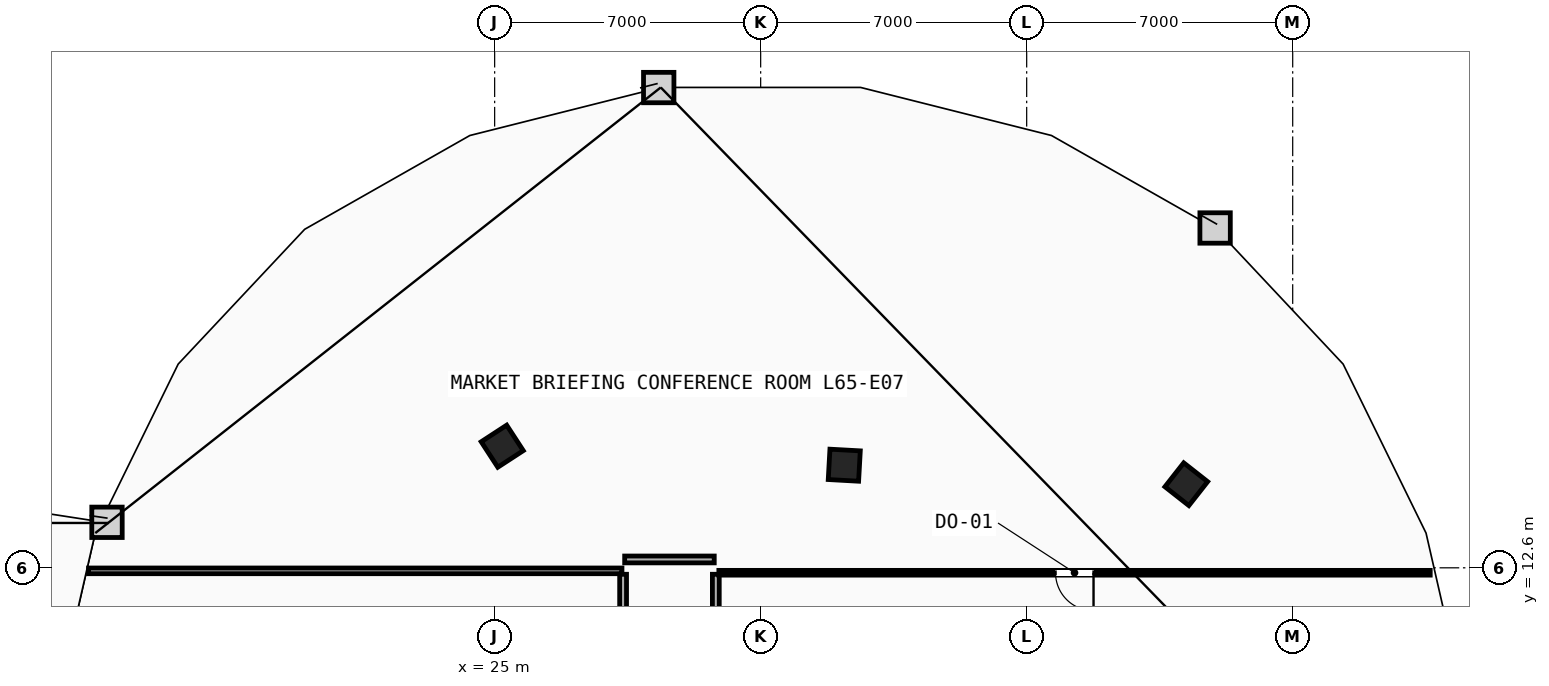
"""IFC4 building model, lengths in metres.
Left out: names, types, materials, properties, quantities, classifications, styles, units other than length and angle.
Written with IfcOpenShell. Run it as: python <this file> out.ifc"""

import sys

from ifc_helpers import new_model, si_unit, direction, frame, frame_2d, origin, origin_2d, place, context, subcontext, project, spatial, rectangle, extrude, element, fill, save


model = new_model("IFC4")
c1 = context("Model", 3, precision=1e-05, world=origin(), true_north=direction((0.0, 1.0)))
c2 = subcontext(c1, "Body", "Model", "MODEL_VIEW")
j1 = project(units=[si_unit("LENGTHUNIT", "METRE"), si_unit("PLANEANGLEUNIT", "RADIAN")], contexts=[c1])
p1 = place(None, origin())
s1 = spatial("IfcSite", under=j1, at=p1, CompositionType="ELEMENT")
p2 = place(p1, origin())
s2 = spatial("IfcBuilding", under=s1, at=p2, CompositionType="ELEMENT")
p3 = place(p2, frame((0.0, 0.0, 246.8)))
s3 = spatial("IfcBuildingStorey", under=s2, at=p3, CompositionType="ELEMENT", Elevation=246.8)
for number, where, z_axis, x_axis in (
    (1, (43.2, 14.8, 0.0), (0.0, 0.0, 1.0), (-0.786, 0.618, 0.0)),
    (2, (34.2, 15.3, 0.0), (0.0, 0.0, 1.0), (-0.998, 0.055, 0.0)),
    (3, (25.2, 15.8, 0.0), (0.0, 0.0, 1.0), (-0.838, -0.546, 0.0)),
):
    element("IfcColumn", number, at=place(p3, frame(where, z_axis=z_axis, x_axis=x_axis)), inside=s3, PredefinedType="COLUMN", context=c2, shape_type="SweptSolid", body=[
        extrude(rectangle(XDim=0.8, YDim=0.8, at=origin_2d()), origin(), (0.0, 0.0, 1.0), 3.6),
    ])
p4 = place(p3, frame((14.314, 12.52, 0.0), z_axis=(0.0, 0.0, 1.0), x_axis=(1.0, 0.0, 0.0)))
e4 = element("IfcWall", 4, at=p4, inside=s3, PredefinedType="PARTITIONING", context=c2, shape_type="SweptSolid", body=[
    extrude(rectangle(XDim=14.036, YDim=0.15, at=frame_2d((7.018, 0.0))), origin(), (0.0, 0.0, 1.0), 3.34),
])
p5 = place(p3, frame((28.38, 12.43, 0.0), z_axis=(0.0, 0.0, 1.0), x_axis=(0.0, -1.0, 0.0)))
e5 = element("IfcWall", 5, at=p5, inside=s3, PredefinedType="PARTITIONING", context=c2, shape_type="SweptSolid", body=[
    extrude(rectangle(XDim=6.36, YDim=0.18, at=frame_2d((3.18, 0.0))), origin(), (0.0, 0.0, 1.0), 3.34),
])
p6 = place(p5, frame((2.68, 0.0, 0.0)))
e6 = element("IfcOpeningElement", 6, at=p6, cuts=e5, PredefinedType="OPENING", context=c2, shape_type="SweptSolid", body=[
    extrude(rectangle(XDim=1.0, YDim=2.15, at=frame_2d((0.5, 1.075))), frame((0.0, 0.1, 0.0), z_axis=(0.0, -1.0, 0.0), x_axis=(1.0, 0.0, 0.0)), (0.0, 0.0, 1.0), 0.2),
])
p7 = place(p3, frame((30.82, 6.07, 0.0), z_axis=(0.0, 0.0, 1.0), x_axis=(0.0, 1.0, 0.0)))
e7 = element("IfcWall", 7, at=p7, inside=s3, PredefinedType="PARTITIONING", context=c2, shape_type="SweptSolid", body=[
    extrude(rectangle(XDim=6.36, YDim=0.18, at=frame_2d((3.18, 0.0))), origin(), (0.0, 0.0, 1.0), 3.34),
])
p8 = place(p7, frame((2.68, 0.0, 0.0)))
e8 = element("IfcOpeningElement", 8, at=p8, cuts=e7, PredefinedType="OPENING", context=c2, shape_type="SweptSolid", body=[
    extrude(rectangle(XDim=1.0, YDim=2.15, at=frame_2d((0.5, 1.075))), frame((0.0, 0.1, 0.0), z_axis=(0.0, -1.0, 0.0), x_axis=(1.0, 0.0, 0.0)), (0.0, 0.0, 1.0), 0.2),
])
p9 = place(p3, frame((30.779, 12.82, 0.0), z_axis=(0.0, 0.0, 1.0), x_axis=(-1.0, 0.0, 0.0)))
e9 = element("IfcWall", 9, at=p9, inside=s3, PredefinedType="PARTITIONING", context=c2, shape_type="SweptSolid", body=[
    extrude(rectangle(XDim=2.357, YDim=0.18, at=frame_2d((1.179, 0.0))), origin(), (0.0, 0.0, 1.0), 3.34),
])
p10 = place(p3, frame((49.619, 12.47, 0.0), z_axis=(0.0, 0.0, 1.0), x_axis=(-1.0, 0.0, 0.0)))
e10 = element("IfcWall", 10, at=p10, inside=s3, PredefinedType="PARTITIONING", context=c2, shape_type="SweptSolid", body=[
    extrude(rectangle(XDim=18.719, YDim=0.125, at=frame_2d((9.359, 0.0))), origin(), (0.0, 0.0, 1.0), 3.34),
])
p11 = place(p10, frame((8.859, 0.0, 0.0)))
e11 = element("IfcOpeningElement", 11, at=p11, cuts=e10, PredefinedType="OPENING", context=c2, shape_type="SweptSolid", body=[
    extrude(rectangle(XDim=1.0, YDim=2.15, at=frame_2d((0.5, 1.075))), frame((0.0, 0.073, 0.0), z_axis=(0.0, -1.0, 0.0), x_axis=(1.0, 0.0, 0.0)), (0.0, 0.0, 1.0), 0.145),
])
p12 = place(p11, origin())
e12 = element("IfcDoor", 12, at=p12, inside=s3, OperationType="SINGLE_SWING_LEFT", PredefinedType="DOOR", context=c2, shape_type="SweptSolid", body=[
    extrude(rectangle(XDim=1.0, YDim=2.15, at=frame_2d((0.5, 1.075))), frame((0.0, 0.025, 0.0), z_axis=(0.0, -1.0, 0.0), x_axis=(1.0, 0.0, 0.0)), (0.0, 0.0, 1.0), 0.05),
])
fill(e11, e12)
save(model, sys.argv[1])
